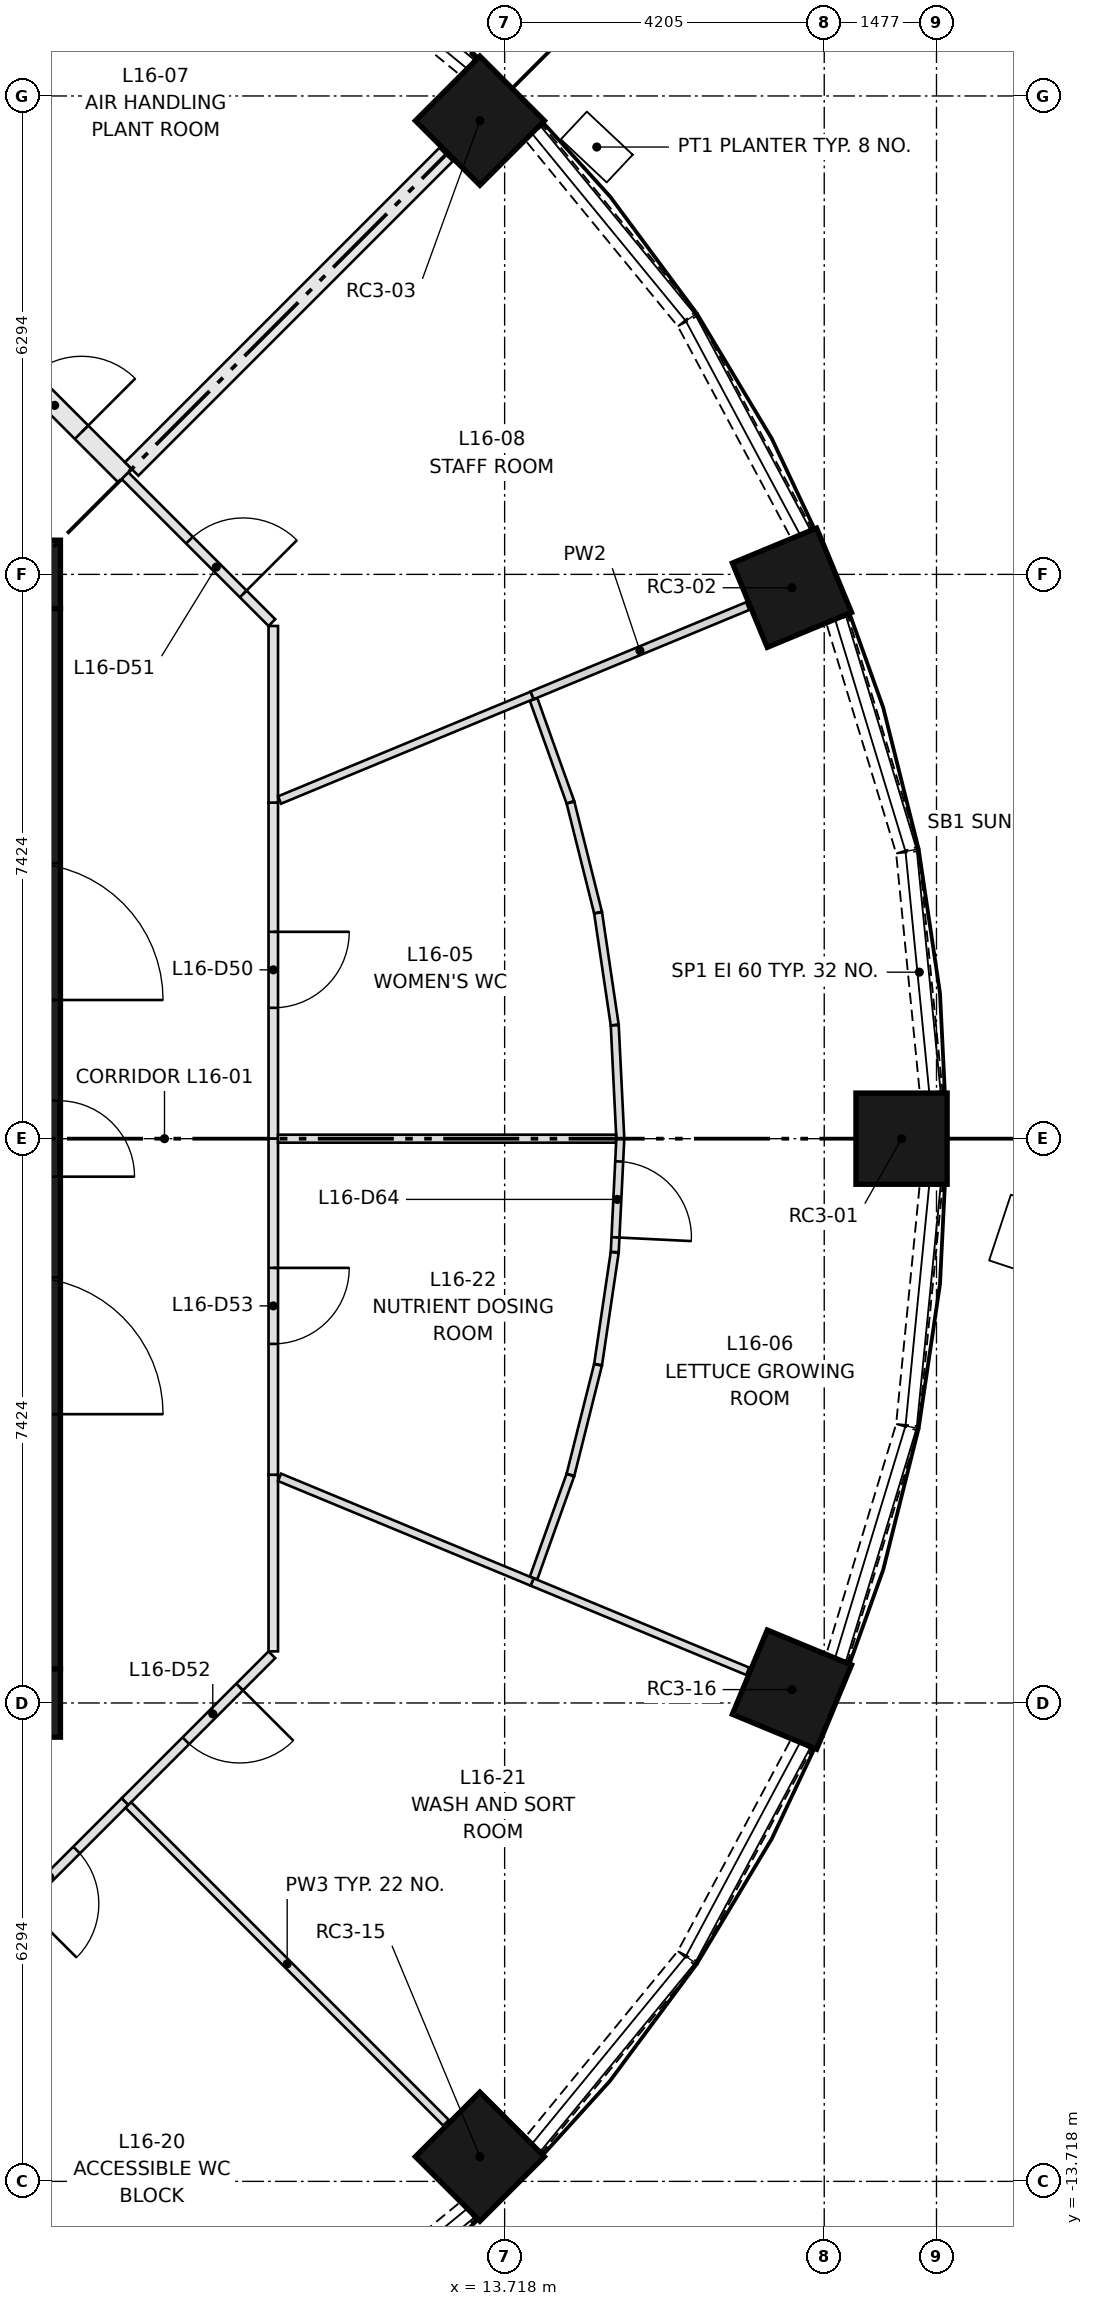
"""IFC4 building model, lengths in metres.
Left out: names, types, materials, properties, quantities, classifications, styles, units other than length and angle.
Written with IfcOpenShell. Run it as: python <this file> out.ifc"""

import sys

from ifc_helpers import new_model, si_unit, direction, frame, frame_2d, origin, origin_2d, place, context, subcontext, project, spatial, rectangle, extrude, element, fill, save


model = new_model("IFC4")
c1 = context("Model", 3, precision=1e-05, world=origin(), true_north=direction((0.0, 1.0)))
c2 = subcontext(c1, "Body", "Model", "MODEL_VIEW")
j1 = project(units=[si_unit("LENGTHUNIT", "METRE"), si_unit("PLANEANGLEUNIT", "RADIAN")], contexts=[c1])
p1 = place(None, origin())
s1 = spatial("IfcSite", under=j1, at=p1, CompositionType="ELEMENT")
p2 = place(p1, origin())
s2 = spatial("IfcBuilding", under=s1, at=p2, CompositionType="ELEMENT")
p3 = place(p2, frame((0.0, 0.0, 62.7)))
s3 = spatial("IfcBuildingStorey", under=s2, at=p3, CompositionType="ELEMENT", Elevation=62.7)
for number, where, z_axis, x_axis in (
    (1, (18.94, 0.0, 0.0), (0.0, 0.0, 1.0), (1.0, 0.0, 0.0)),
    (2, (17.498, 7.248, 0.0), (0.0, 0.0, 1.0), (0.924, 0.383, 0.0)),
    (3, (13.393, 13.393, 0.0), (0.0, 0.0, 1.0), (0.707, 0.707, 0.0)),
    (4, (13.393, -13.393, 0.0), (0.0, 0.0, 1.0), (0.707, -0.707, 0.0)),
    (5, (17.498, -7.248, 0.0), (0.0, 0.0, 1.0), (0.924, -0.383, 0.0)),
):
    element("IfcColumn", number, at=place(p3, frame(where, z_axis=z_axis, x_axis=x_axis)), inside=s3, PredefinedType="COLUMN", context=c2, shape_type="SweptSolid", body=[
        extrude(rectangle(XDim=1.2, YDim=1.2, at=origin_2d()), origin(), (0.0, 0.0, 1.0), 3.65),
    ])
for number, where, z_axis, x_axis in (
    (6, (-7.874, -7.424, 0.0), (0.0, 0.0, 1.0), (1.0, 0.0, 0.0)),
    (7, (-7.874, 7.424, 0.0), (0.0, 0.0, 1.0), (1.0, 0.0, 0.0)),
):
    element("IfcWall", number, at=place(p3, frame(where, z_axis=z_axis, x_axis=x_axis)), inside=s3, PredefinedType="SHEAR", context=c2, shape_type="SweptSolid", body=[
        extrude(rectangle(XDim=15.748, YDim=0.9, at=frame_2d((7.874, 0.0))), origin(), (0.0, 0.0, 1.0), 3.65),
    ])
p4 = place(p3, frame((7.424, -6.974, 0.0), z_axis=(0.0, 0.0, 1.0), x_axis=(0.0, 1.0, 0.0)))
e8 = element("IfcWall", 8, at=p4, inside=s3, PredefinedType="SHEAR", context=c2, shape_type="SweptSolid", body=[
    extrude(rectangle(XDim=13.948, YDim=0.9, at=frame_2d((6.974, 0.0))), origin(), (0.0, 0.0, 1.0), 3.65),
])
p5 = place(p4, frame((6.474, 0.0, 0.0)))
e9 = element("IfcOpeningElement", 9, at=p5, cuts=e8, PredefinedType="OPENING", context=c2, shape_type="SweptSolid", body=[
    extrude(rectangle(XDim=1.0, YDim=2.1, at=frame_2d((0.5, 1.05))), frame((0.0, 0.46, 0.0), z_axis=(0.0, -1.0, 0.0), x_axis=(1.0, 0.0, 0.0)), (0.0, 0.0, 1.0), 0.92),
])
p6 = place(p4, frame((3.35, 0.0, 0.0)))
e10 = element("IfcOpeningElement", 10, at=p6, cuts=e8, PredefinedType="OPENING", context=c2, shape_type="SweptSolid", body=[
    extrude(rectangle(XDim=1.8, YDim=2.1, at=frame_2d((0.9, 1.05))), frame((0.0, 0.46, 0.0), z_axis=(0.0, -1.0, 0.0), x_axis=(1.0, 0.0, 0.0)), (0.0, 0.0, 1.0), 0.92),
])
p7 = place(p4, frame((8.799, 0.0, 0.0)))
e11 = element("IfcOpeningElement", 11, at=p7, cuts=e8, PredefinedType="OPENING", context=c2, shape_type="SweptSolid", body=[
    extrude(rectangle(XDim=1.8, YDim=2.1, at=frame_2d((0.9, 1.05))), frame((0.0, 0.46, 0.0), z_axis=(0.0, -1.0, 0.0), x_axis=(1.0, 0.0, 0.0)), (0.0, 0.0, 1.0), 0.92),
])
p8 = place(p3, frame((19.33, 0.613, 0.0), z_axis=(0.0, 0.0, 1.0), x_axis=(-0.098100807709, 0.995176482603, 0.0)))
e12 = element("IfcWall", 12, at=p8, inside=s3, PredefinedType="SOLIDWALL", context=c2, shape_type="SweptSolid", body=[
    extrude(rectangle(XDim=3.171, YDim=0.3, at=frame_2d((1.585, 0.0))), origin(), (0.0, 0.0, 1.0), 0.9),
])
p9 = place(p3, frame((19.013, 3.797, 0.0), z_axis=(0.0, 0.0, 1.0), x_axis=(-0.290456409527, 0.956888224489, 0.0)))
e13 = element("IfcWall", 13, at=p9, inside=s3, PredefinedType="SOLIDWALL", context=c2, shape_type="SweptSolid", body=[
    extrude(rectangle(XDim=3.169, YDim=0.3, at=frame_2d((1.584, 0.0))), origin(), (0.0, 0.0, 1.0), 0.9),
])
p10 = place(p3, frame((17.623, 7.963, 0.0), z_axis=(0.0, 0.0, 1.0), x_axis=(-0.47123575379, 0.882007292685, 0.0)))
e14 = element("IfcWall", 14, at=p10, inside=s3, PredefinedType="SOLIDWALL", context=c2, shape_type="SweptSolid", body=[
    extrude(rectangle(XDim=3.17, YDim=0.3, at=frame_2d((1.585, 0.0))), origin(), (0.0, 0.0, 1.0), 0.9),
])
for number, where, z_axis, x_axis in (
    (15, (16.113, 10.784, 0.0), (0.0, 0.0, 1.0), (-0.634, 0.773, 0.0)),
    (16, (13.234, 14.103, 0.0), (0.0, 0.0, 1.0), (-0.773, 0.634, 0.0)),
    (17, (10.784, -16.113, 0.0), (0.0, 0.0, 1.0), (0.773, 0.634, 0.0)),
    (18, (14.103, -13.234, 0.0), (0.0, 0.0, 1.0), (0.634, 0.773, 0.0)),
):
    element("IfcWall", number, at=place(p3, frame(where, z_axis=z_axis, x_axis=x_axis)), inside=s3, PredefinedType="SOLIDWALL", context=c2, shape_type="SweptSolid", body=[
        extrude(rectangle(XDim=3.169, YDim=0.3, at=frame_2d((1.585, 0.0))), origin(), (0.0, 0.0, 1.0), 0.9),
    ])
p11 = place(p3, frame((16.129, -10.759, 0.0), z_axis=(0.0, 0.0, 1.0), x_axis=(0.47123575379, 0.882007292685, 0.0)))
e19 = element("IfcWall", 19, at=p11, inside=s3, PredefinedType="SOLIDWALL", context=c2, shape_type="SweptSolid", body=[
    extrude(rectangle(XDim=3.17, YDim=0.3, at=frame_2d((1.585, 0.0))), origin(), (0.0, 0.0, 1.0), 0.9),
])
p12 = place(p3, frame((18.092, -6.83, 0.0), z_axis=(0.0, 0.0, 1.0), x_axis=(0.290456409527, 0.956888224489, 0.0)))
e20 = element("IfcWall", 20, at=p12, inside=s3, PredefinedType="SOLIDWALL", context=c2, shape_type="SweptSolid", body=[
    extrude(rectangle(XDim=3.169, YDim=0.3, at=frame_2d((1.584, 0.0))), origin(), (0.0, 0.0, 1.0), 0.9),
])
p13 = place(p3, frame((19.019, -3.768, 0.0), z_axis=(0.0, 0.0, 1.0), x_axis=(0.098100807709, 0.995176482603, 0.0)))
e21 = element("IfcWall", 21, at=p13, inside=s3, PredefinedType="SOLIDWALL", context=c2, shape_type="SweptSolid", body=[
    extrude(rectangle(XDim=3.171, YDim=0.3, at=frame_2d((1.585, 0.0))), origin(), (0.0, 0.0, 1.0), 0.9),
])
p14 = place(p3, frame((10.674, 4.421, 0.0), z_axis=(0.0, 0.0, 1.0), x_axis=(0.0, -1.0, 0.0)))
e22 = element("IfcWall", 22, at=p14, inside=s3, PredefinedType="PARTITIONING", context=c2, shape_type="SweptSolid", body=[
    extrude(rectangle(XDim=4.421, YDim=0.125, at=frame_2d((2.211, 0.0))), origin(), (0.0, 0.0, 1.0), 3.3),
])
p15 = place(p14, frame((1.7, 0.0, 0.0)))
e23 = element("IfcOpeningElement", 23, at=p15, cuts=e22, PredefinedType="OPENING", context=c2, shape_type="SweptSolid", body=[
    extrude(rectangle(XDim=1.0, YDim=2.1, at=frame_2d((0.5, 1.05))), frame((0.0, 0.073, 0.0), z_axis=(0.0, -1.0, 0.0), x_axis=(1.0, 0.0, 0.0)), (0.0, 0.0, 1.0), 0.145),
])
p16 = place(p3, frame((8.722, 8.722, 0.0), z_axis=(0.0, 0.0, 1.0), x_axis=(0.707151428813, -0.707062130741, 0.0)))
e24 = element("IfcWall", 24, at=p16, inside=s3, PredefinedType="PARTITIONING", context=c2, shape_type="SweptSolid", body=[
    extrude(rectangle(XDim=2.734, YDim=0.125, at=frame_2d((1.367, 0.0))), origin(), (0.0, 0.0, 1.0), 3.3),
])
p17 = place(p16, frame((1.2, 0.0, 0.0)))
e25 = element("IfcOpeningElement", 25, at=p17, cuts=e24, PredefinedType="OPENING", context=c2, shape_type="SweptSolid", body=[
    extrude(rectangle(XDim=1.0, YDim=2.1, at=frame_2d((0.5, 1.05))), frame((0.0, 0.073, 0.0), z_axis=(0.0, -1.0, 0.0), x_axis=(1.0, 0.0, 0.0)), (0.0, 0.0, 1.0), 0.145),
])
p18 = place(p3, frame((10.674, 6.745, 0.0), z_axis=(0.0, 0.0, 1.0), x_axis=(0.0, -1.0, 0.0)))
e26 = element("IfcWall", 26, at=p18, inside=s3, PredefinedType="PARTITIONING", context=c2, shape_type="SweptSolid", body=[
    extrude(rectangle(XDim=2.324, YDim=0.125, at=frame_2d((1.162, 0.0))), origin(), (0.0, 0.0, 1.0), 3.3),
])
p19 = place(p3, frame((10.656, -6.789, 0.0), z_axis=(0.0, 0.0, 1.0), x_axis=(-0.707151428813, -0.707062130741, 0.0)))
e27 = element("IfcWall", 27, at=p19, inside=s3, PredefinedType="PARTITIONING", context=c2, shape_type="SweptSolid", body=[
    extrude(rectangle(XDim=2.734, YDim=0.125, at=frame_2d((1.367, 0.0))), origin(), (0.0, 0.0, 1.0), 3.3),
])
p20 = place(p19, frame((0.6, 0.0, 0.0)))
e28 = element("IfcOpeningElement", 28, at=p20, cuts=e27, PredefinedType="OPENING", context=c2, shape_type="SweptSolid", body=[
    extrude(rectangle(XDim=1.0, YDim=2.1, at=frame_2d((0.5, 1.05))), frame((0.0, 0.073, 0.0), z_axis=(0.0, -1.0, 0.0), x_axis=(1.0, 0.0, 0.0)), (0.0, 0.0, 1.0), 0.145),
])
p21 = place(p3, frame((10.674, -4.421, 0.0), z_axis=(0.0, 0.0, 1.0), x_axis=(0.0, -1.0, 0.0)))
e29 = element("IfcWall", 29, at=p21, inside=s3, PredefinedType="PARTITIONING", context=c2, shape_type="SweptSolid", body=[
    extrude(rectangle(XDim=2.324, YDim=0.125, at=frame_2d((1.162, 0.0))), origin(), (0.0, 0.0, 1.0), 3.3),
])
p22 = place(p3, frame((10.674, 0.0, 0.0), z_axis=(0.0, 0.0, 1.0), x_axis=(0.0, -1.0, 0.0)))
e30 = element("IfcWall", 30, at=p22, inside=s3, PredefinedType="PARTITIONING", context=c2, shape_type="SweptSolid", body=[
    extrude(rectangle(XDim=4.421, YDim=0.125, at=frame_2d((2.211, 0.0))), origin(), (0.0, 0.0, 1.0), 3.3),
])
p23 = place(p22, frame((1.7, 0.0, 0.0)))
e31 = element("IfcOpeningElement", 31, at=p23, cuts=e30, PredefinedType="OPENING", context=c2, shape_type="SweptSolid", body=[
    extrude(rectangle(XDim=1.0, YDim=2.1, at=frame_2d((0.5, 1.05))), frame((0.0, 0.073, 0.0), z_axis=(0.0, -1.0, 0.0), x_axis=(1.0, 0.0, 0.0)), (0.0, 0.0, 1.0), 0.145),
])
p24 = place(p3, frame((6.808, 10.637, 0.0), z_axis=(0.0, 0.0, 1.0), x_axis=(0.707061703777, -0.707151855722, 0.0)))
e32 = element("IfcWall", 32, at=p24, inside=s3, PredefinedType="PARTITIONING", context=c2, shape_type="SweptSolid", body=[
    extrude(rectangle(XDim=2.708, YDim=0.25, at=frame_2d((1.354, 0.0))), origin(), (0.0, 0.0, 1.0), 3.3),
])
p25 = place(p24, frame((0.9, 0.0, 0.0)))
e33 = element("IfcOpeningElement", 33, at=p25, cuts=e32, PredefinedType="OPENING", context=c2, shape_type="SweptSolid", body=[
    extrude(rectangle(XDim=1.0, YDim=2.1, at=frame_2d((0.5, 1.05))), frame((0.0, 0.135, 0.0), z_axis=(0.0, -1.0, 0.0), x_axis=(1.0, 0.0, 0.0)), (0.0, 0.0, 1.0), 0.27),
])
p26 = place(p3, frame((8.722, -8.722, 0.0), z_axis=(0.0, 0.0, 1.0), x_axis=(-0.707062130741, -0.707151428813, 0.0)))
e34 = element("IfcWall", 34, at=p26, inside=s3, PredefinedType="PARTITIONING", context=c2, shape_type="SweptSolid", body=[
    extrude(rectangle(XDim=2.734, YDim=0.125, at=frame_2d((1.367, 0.0))), origin(), (0.0, 0.0, 1.0), 3.3),
])
p27 = place(p26, frame((0.9, 0.0, 0.0)))
e35 = element("IfcOpeningElement", 35, at=p27, cuts=e34, PredefinedType="OPENING", context=c2, shape_type="SweptSolid", body=[
    extrude(rectangle(XDim=1.0, YDim=2.1, at=frame_2d((0.5, 1.05))), frame((0.0, 0.073, 0.0), z_axis=(0.0, -1.0, 0.0), x_axis=(1.0, 0.0, 0.0)), (0.0, 0.0, 1.0), 0.145),
])
p28 = place(p3, frame((14.099, 5.778, 0.0), z_axis=(0.0, 0.0, 1.0), x_axis=(0.336918127064, -0.941533948222, 0.0)))
e36 = element("IfcWall", 36, at=p28, inside=s3, PredefinedType="PARTITIONING", context=c2, shape_type="SweptSolid", body=[
    extrude(rectangle(XDim=1.436, YDim=0.105, at=frame_2d((0.718, 0.0))), origin(), (0.0, 0.0, 1.0), 3.3),
])
for number, where, z_axis, x_axis in (
    (37, (14.584, 4.421, 0.0), (0.0, 0.0, 1.0), (0.243, -0.97, 0.0)),
    (38, (14.948, 2.971, 0.0), (0.0, 0.0, 1.0), (0.147, -0.989, 0.0)),
):
    element("IfcWall", number, at=place(p3, frame(where, z_axis=z_axis, x_axis=x_axis)), inside=s3, PredefinedType="PARTITIONING", context=c2, shape_type="SweptSolid", body=[
        extrude(rectangle(XDim=1.49, YDim=0.105, at=frame_2d((0.745, 0.0))), origin(), (0.0, 0.0, 1.0), 3.3),
    ])
p29 = place(p3, frame((15.167, 1.491, 0.0), z_axis=(0.0, 0.0, 1.0), x_axis=(0.049056777577, -0.998795991469, 0.0)))
e39 = element("IfcWall", 39, at=p29, inside=s3, PredefinedType="PARTITIONING", context=c2, shape_type="SweptSolid", body=[
    extrude(rectangle(XDim=1.493, YDim=0.105, at=frame_2d((0.747, 0.0))), origin(), (0.0, 0.0, 1.0), 3.3),
])
p30 = place(p3, frame((10.757, 4.456, 0.0), z_axis=(0.0, 0.0, 1.0), x_axis=(0.923886131731, 0.382667500051, 0.0)))
e40 = element("IfcWall", 40, at=p30, inside=s3, PredefinedType="PARTITIONING", context=c2, shape_type="SweptSolid", body=[
    extrude(rectangle(XDim=3.597, YDim=0.105, at=frame_2d((1.798, 0.0))), origin(), (0.0, 0.0, 1.0), 3.3),
])
p31 = place(p3, frame((15.185, 0.0, 0.0), z_axis=(0.0, 0.0, 1.0), x_axis=(-1.0, 0.0, 0.0)))
e41 = element("IfcWall", 41, at=p31, inside=s3, PredefinedType="PARTITIONING", context=c2, shape_type="SweptSolid", body=[
    extrude(rectangle(XDim=4.448, YDim=0.105, at=frame_2d((2.224, 0.0))), origin(), (0.0, 0.0, 1.0), 3.3),
])
p32 = place(p3, frame((14.08, 5.832, 0.0), z_axis=(0.0, 0.0, 1.0), x_axis=(0.923860783753, 0.382728692736, 0.0)))
e42 = element("IfcWall", 42, at=p32, inside=s3, PredefinedType="PARTITIONING", context=c2, shape_type="SweptSolid", body=[
    extrude(rectangle(XDim=3.07, YDim=0.11, at=frame_2d((1.535, 0.0))), origin(), (0.0, 0.0, 1.0), 3.3),
])
p33 = place(p3, frame((16.916, -7.007, 0.0), z_axis=(0.0, 0.0, 1.0), x_axis=(-0.923860783753, 0.382728692736, 0.0)))
e43 = element("IfcWall", 43, at=p33, inside=s3, PredefinedType="PARTITIONING", context=c2, shape_type="SweptSolid", body=[
    extrude(rectangle(XDim=3.07, YDim=0.105, at=frame_2d((1.535, 0.0))), origin(), (0.0, 0.0, 1.0), 3.3),
])
p34 = place(p3, frame((14.098, -5.78, 0.0), z_axis=(0.0, 0.0, 1.0), x_axis=(0.336981574949, 0.941511241646, 0.0)))
e44 = element("IfcWall", 44, at=p34, inside=s3, PredefinedType="PARTITIONING", context=c2, shape_type="SweptSolid", body=[
    extrude(rectangle(XDim=1.438, YDim=0.105, at=frame_2d((0.719, 0.0))), origin(), (0.0, 0.0, 1.0), 3.3),
])
for number, where, z_axis, x_axis in (
    (45, (14.584, -4.421, 0.0), (0.0, 0.0, 1.0), (0.243, 0.97, 0.0)),
    (46, (14.948, -2.971, 0.0), (0.0, 0.0, 1.0), (0.147, 0.989, 0.0)),
):
    element("IfcWall", number, at=place(p3, frame(where, z_axis=z_axis, x_axis=x_axis)), inside=s3, PredefinedType="PARTITIONING", context=c2, shape_type="SweptSolid", body=[
        extrude(rectangle(XDim=1.49, YDim=0.105, at=frame_2d((0.745, 0.0))), origin(), (0.0, 0.0, 1.0), 3.3),
    ])
p35 = place(p3, frame((15.24, 0.0, 0.0), z_axis=(0.0, 0.0, 1.0), x_axis=(-0.049056777577, -0.998795991469, 0.0)))
e47 = element("IfcWall", 47, at=p35, inside=s3, PredefinedType="PARTITIONING", context=c2, shape_type="SweptSolid", body=[
    extrude(rectangle(XDim=1.493, YDim=0.105, at=frame_2d((0.747, 0.0))), origin(), (0.0, 0.0, 1.0), 3.3),
])
p36 = place(p35, frame((0.3, 0.0, 0.0)))
e48 = element("IfcOpeningElement", 48, at=p36, cuts=e47, PredefinedType="OPENING", context=c2, shape_type="SweptSolid", body=[
    extrude(rectangle(XDim=1.0, YDim=2.1, at=frame_2d((0.5, 1.05))), frame((0.0, 0.062, 0.0), z_axis=(0.0, -1.0, 0.0), x_axis=(1.0, 0.0, 0.0)), (0.0, 0.0, 1.0), 0.125),
])
p37 = place(p3, frame((12.947, 12.947, 0.0), z_axis=(0.0, 0.0, 1.0), x_axis=(-0.707106781187, -0.707106781187, 0.0)))
e49 = element("IfcWall", 49, at=p37, inside=s3, PredefinedType="PARTITIONING", context=c2, shape_type="SweptSolid", body=[
    extrude(rectangle(XDim=5.85, YDim=0.25, at=frame_2d((2.925, 0.0))), origin(), (0.0, 0.0, 1.0), 3.3),
])
p38 = place(p3, frame((8.767, -8.767, 0.0), z_axis=(0.0, 0.0, 1.0), x_axis=(0.707106781187, -0.707106781187, 0.0)))
e50 = element("IfcWall", 50, at=p38, inside=s3, PredefinedType="PARTITIONING", context=c2, shape_type="SweptSolid", body=[
    extrude(rectangle(XDim=5.912, YDim=0.105, at=frame_2d((2.956, 0.0))), origin(), (0.0, 0.0, 1.0), 3.3),
])
p39 = place(p3, frame((10.757, -4.456, 0.0), z_axis=(0.0, 0.0, 1.0), x_axis=(0.923886131731, -0.382667500051, 0.0)))
e51 = element("IfcWall", 51, at=p39, inside=s3, PredefinedType="PARTITIONING", context=c2, shape_type="SweptSolid", body=[
    extrude(rectangle(XDim=3.597, YDim=0.105, at=frame_2d((1.798, 0.0))), origin(), (0.0, 0.0, 1.0), 3.3),
])
p40 = place(p5, frame((1.0, 0.0, 0.0), z_axis=(0.0, 0.0, 1.0), x_axis=(-1.0, 0.0, 0.0)))
e52 = element("IfcDoor", 52, at=p40, inside=s3, OperationType="SINGLE_SWING_LEFT", PredefinedType="DOOR", context=c2, shape_type="SweptSolid", body=[
    extrude(rectangle(XDim=1.0, YDim=2.1, at=frame_2d((0.5, 1.05))), frame((0.0, 0.45, 0.0), z_axis=(0.0, -1.0, 0.0), x_axis=(1.0, 0.0, 0.0)), (0.0, 0.0, 1.0), 0.05),
])
fill(e9, e52)
p41 = place(p15, origin())
e53 = element("IfcDoor", 53, at=p41, inside=s3, OperationType="SINGLE_SWING_LEFT", PredefinedType="DOOR", context=c2, shape_type="SweptSolid", body=[
    extrude(rectangle(XDim=1.0, YDim=2.1, at=frame_2d((0.5, 1.05))), frame((0.0, 0.025, 0.0), z_axis=(0.0, -1.0, 0.0), x_axis=(1.0, 0.0, 0.0)), (0.0, 0.0, 1.0), 0.05),
])
fill(e23, e53)
p42 = place(p17, origin())
e54 = element("IfcDoor", 54, at=p42, inside=s3, OperationType="SINGLE_SWING_RIGHT", PredefinedType="DOOR", context=c2, shape_type="SweptSolid", body=[
    extrude(rectangle(XDim=1.0, YDim=2.1, at=frame_2d((0.5, 1.05))), frame((0.0, 0.025, 0.0), z_axis=(0.0, -1.0, 0.0), x_axis=(1.0, 0.0, 0.0)), (0.0, 0.0, 1.0), 0.05),
])
fill(e25, e54)
p43 = place(p20, origin())
e55 = element("IfcDoor", 55, at=p43, inside=s3, OperationType="SINGLE_SWING_LEFT", PredefinedType="DOOR", context=c2, shape_type="SweptSolid", body=[
    extrude(rectangle(XDim=1.0, YDim=2.1, at=frame_2d((0.5, 1.05))), frame((0.0, 0.025, 0.0), z_axis=(0.0, -1.0, 0.0), x_axis=(1.0, 0.0, 0.0)), (0.0, 0.0, 1.0), 0.05),
])
fill(e28, e55)
p44 = place(p23, origin())
e56 = element("IfcDoor", 56, at=p44, inside=s3, OperationType="SINGLE_SWING_LEFT", PredefinedType="DOOR", context=c2, shape_type="SweptSolid", body=[
    extrude(rectangle(XDim=1.0, YDim=2.1, at=frame_2d((0.5, 1.05))), frame((0.0, 0.025, 0.0), z_axis=(0.0, -1.0, 0.0), x_axis=(1.0, 0.0, 0.0)), (0.0, 0.0, 1.0), 0.05),
])
fill(e31, e56)
p45 = place(p25, origin())
e57 = element("IfcDoor", 57, at=p45, inside=s3, OperationType="SINGLE_SWING_RIGHT", PredefinedType="DOOR", context=c2, shape_type="SweptSolid", body=[
    extrude(rectangle(XDim=1.0, YDim=2.1, at=frame_2d((0.5, 1.05))), frame((0.0, 0.025, 0.0), z_axis=(0.0, -1.0, 0.0), x_axis=(1.0, 0.0, 0.0)), (0.0, 0.0, 1.0), 0.05),
])
fill(e33, e57)
p46 = place(p27, origin())
e58 = element("IfcDoor", 58, at=p46, inside=s3, OperationType="SINGLE_SWING_RIGHT", PredefinedType="DOOR", context=c2, shape_type="SweptSolid", body=[
    extrude(rectangle(XDim=1.0, YDim=2.1, at=frame_2d((0.5, 1.05))), frame((0.0, 0.025, 0.0), z_axis=(0.0, -1.0, 0.0), x_axis=(1.0, 0.0, 0.0)), (0.0, 0.0, 1.0), 0.05),
])
fill(e35, e58)
p47 = place(p36, origin())
e59 = element("IfcDoor", 59, at=p47, inside=s3, OperationType="SINGLE_SWING_RIGHT", PredefinedType="DOOR", context=c2, shape_type="SweptSolid", body=[
    extrude(rectangle(XDim=1.0, YDim=2.1, at=frame_2d((0.5, 1.05))), frame((0.0, 0.025, 0.0), z_axis=(0.0, -1.0, 0.0), x_axis=(1.0, 0.0, 0.0)), (0.0, 0.0, 1.0), 0.05),
])
fill(e48, e59)
save(model, sys.argv[1])
